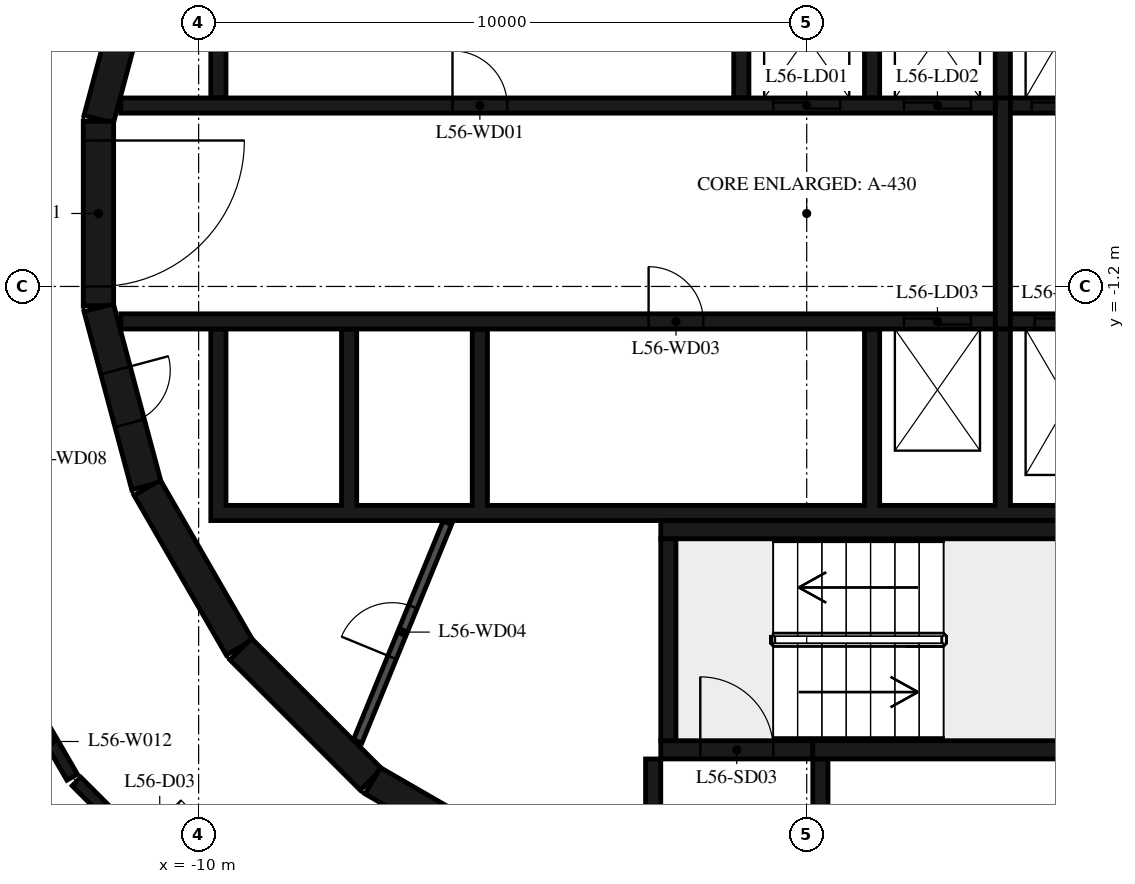
"""IFC4 building model, lengths in metres.
Left out: names, types, materials, properties, quantities, classifications, styles, units other than length and angle.
Written with IfcOpenShell. Run it as: python <this file> out.ifc"""

import sys

from ifc_helpers import new_model, si_unit, direction, frame, frame_2d, origin, place, context, subcontext, project, spatial, polyline, rectangle, outline, extrude, element, fill, save


model = new_model("IFC4")
c1 = context("Model", 3, precision=1e-05, world=origin(), true_north=direction((0.0, 1.0)))
c2 = subcontext(c1, "Body", "Model", "MODEL_VIEW")
j1 = project(units=[si_unit("LENGTHUNIT", "METRE"), si_unit("PLANEANGLEUNIT", "RADIAN")], contexts=[c1])
p1 = place(None, origin())
s1 = spatial("IfcSite", under=j1, at=p1, CompositionType="ELEMENT")
p2 = place(p1, origin())
s2 = spatial("IfcBuilding", under=s1, at=p2, CompositionType="ELEMENT")
p3 = place(p2, frame((0.0, 0.0, 219.9)))
s3 = spatial("IfcBuildingStorey", under=s2, at=p3, CompositionType="ELEMENT", Elevation=219.9)
p4 = place(p3, frame((-10.858, 4.479, 0.0), z_axis=(0.0, 0.0, 1.0), x_axis=(-0.258734743916, -0.965948410781, 0.0)))
e1 = element("IfcWall", 1, at=p4, inside=s3, PredefinedType="SHEAR", context=c2, shape_type="SweptSolid", body=[
    extrude(rectangle(XDim=3.033, YDim=0.5, at=frame_2d((1.516, 0.0))), origin(), (0.0, 0.0, 1.0), 6.35),
])
p5 = place(p3, frame((-11.647, 1.516, 0.0), z_axis=(0.0, 0.0, 1.0), x_axis=(0.0, -1.0, 0.0)))
e2 = element("IfcWall", 2, at=p5, inside=s3, PredefinedType="SHEAR", context=c2, shape_type="SweptSolid", body=[
    extrude(rectangle(XDim=3.033, YDim=0.5, at=frame_2d((1.516, 0.0))), origin(), (0.0, 0.0, 1.0), 6.35),
])
p6 = place(p5, frame((0.316, 0.0, 0.0)))
e3 = element("IfcOpeningElement", 3, at=p6, cuts=e2, PredefinedType="OPENING", context=c2, shape_type="SweptSolid", body=[
    extrude(rectangle(XDim=2.4, YDim=2.1, at=frame_2d((1.2, 1.05))), frame((0.0, 0.26, 0.0), z_axis=(0.0, -1.0, 0.0), x_axis=(1.0, 0.0, 0.0)), (0.0, 0.0, 1.0), 0.52),
])
p7 = place(p3, frame((-11.643, -1.55, 0.0), z_axis=(0.0, 0.0, 1.0), x_axis=(0.258734743916, -0.965948410781, 0.0)))
e4 = element("IfcWall", 4, at=p7, inside=s3, PredefinedType="SHEAR", context=c2, shape_type="SweptSolid", body=[
    extrude(rectangle(XDim=3.033, YDim=0.5, at=frame_2d((1.516, 0.0))), origin(), (0.0, 0.0, 1.0), 6.35),
])
p8 = place(p7, frame((1.066, 0.0, 0.0)))
e5 = element("IfcOpeningElement", 5, at=p8, cuts=e4, PredefinedType="OPENING", context=c2, shape_type="SweptSolid", body=[
    extrude(rectangle(XDim=0.9, YDim=2.1, at=frame_2d((0.45, 1.05))), frame((0.0, 0.26, 0.0), z_axis=(0.0, -1.0, 0.0), x_axis=(1.0, 0.0, 0.0)), (0.0, 0.0, 1.0), 0.52),
])
p9 = place(p3, frame((-10.845, -4.51, 0.0), z_axis=(0.0, 0.0, 1.0), x_axis=(0.500087131594, -0.865975092491, 0.0)))
e6 = element("IfcWall", 6, at=p9, inside=s3, PredefinedType="SHEAR", context=c2, shape_type="SweptSolid", body=[
    extrude(rectangle(XDim=3.033, YDim=0.5, at=frame_2d((1.516, 0.0))), origin(), (0.0, 0.0, 1.0), 6.35),
])
p10 = place(p3, frame((-9.308, -7.164, 0.0), z_axis=(0.0, 0.0, 1.0), x_axis=(0.707106781187, -0.707106781187, 0.0)))
e7 = element("IfcWall", 7, at=p10, inside=s3, PredefinedType="SHEAR", context=c2, shape_type="SweptSolid", body=[
    extrude(rectangle(XDim=3.032, YDim=0.5, at=frame_2d((1.516, 0.0))), origin(), (0.0, 0.0, 1.0), 6.35),
])
p11 = place(p3, frame((-7.137, -9.329, 0.0), z_axis=(0.0, 0.0, 1.0), x_axis=(0.865975092491, -0.500087131594, 0.0)))
e8 = element("IfcWall", 8, at=p11, inside=s3, PredefinedType="SHEAR", context=c2, shape_type="SweptSolid", body=[
    extrude(rectangle(XDim=3.033, YDim=0.5, at=frame_2d((1.516, 0.0))), origin(), (0.0, 0.0, 1.0), 6.35),
])
p12 = place(p3, frame((-2.275, -8.67, 0.0), z_axis=(0.0, 0.0, 1.0), x_axis=(0.0, 1.0, 0.0)))
e9 = element("IfcWall", 9, at=p12, inside=s3, PredefinedType="SHEAR", context=c2, shape_type="SweptSolid", body=[
    extrude(rectangle(XDim=3.32, YDim=0.25, at=frame_2d((1.66, 0.0))), origin(), (0.0, 0.0, 1.0), 6.35),
])
p13 = place(p3, frame((-2.4, -5.2, 0.0), z_axis=(0.0, 0.0, 1.0), x_axis=(1.0, 0.0, 0.0)))
e10 = element("IfcWall", 10, at=p13, inside=s3, PredefinedType="SHEAR", context=c2, shape_type="SweptSolid", body=[
    extrude(rectangle(XDim=7.05, YDim=0.3, at=frame_2d((3.525, 0.0))), origin(), (0.0, 0.0, 1.0), 6.35),
])
p14 = place(p3, frame((0.1, -8.82, 0.0), z_axis=(0.0, 0.0, 1.0), x_axis=(1.0, 0.0, 0.0)))
e11 = element("IfcWall", 11, at=p14, inside=s3, PredefinedType="SHEAR", context=c2, shape_type="SweptSolid", body=[
    extrude(rectangle(XDim=4.55, YDim=0.3, at=frame_2d((2.275, 0.0))), origin(), (0.0, 0.0, 1.0), 6.35),
])
p15 = place(p3, frame((-2.4, -8.82, 0.0), z_axis=(0.0, 0.0, 1.0), x_axis=(1.0, 0.0, 0.0)))
e12 = element("IfcWall", 12, at=p15, inside=s3, PredefinedType="SHEAR", context=c2, shape_type="SweptSolid", body=[
    extrude(rectangle(XDim=2.5, YDim=0.3, at=frame_2d((1.25, 0.0))), origin(), (0.0, 0.0, 1.0), 6.35),
])
p16 = place(p15, frame((0.65, 0.0, 0.0)))
e13 = element("IfcOpeningElement", 13, at=p16, cuts=e12, PredefinedType="OPENING", context=c2, shape_type="SweptSolid", body=[
    extrude(rectangle(XDim=1.2, YDim=2.1, at=frame_2d((0.6, 1.05))), frame((0.0, 0.16, 0.0), z_axis=(0.0, -1.0, 0.0), x_axis=(1.0, 0.0, 0.0)), (0.0, 0.0, 1.0), 0.32),
])
p17 = place(p3, frame((-2.525, -8.97, 0.0), z_axis=(0.0, 0.0, 1.0), x_axis=(0.0, -1.0, 0.0)))
e14 = element("IfcWall", 14, at=p17, inside=s3, PredefinedType="SHEAR", context=c2, shape_type="SweptSolid", body=[
    extrude(rectangle(XDim=2.11, YDim=0.25, at=frame_2d((1.055, 0.0))), origin(), (0.0, 0.0, 1.0), 6.35),
])
p18 = place(p3, frame((0.225, -8.97, 0.0), z_axis=(0.0, 0.0, 1.0), x_axis=(0.0, -1.0, 0.0)))
e15 = element("IfcWall", 15, at=p18, inside=s3, PredefinedType="SHEAR", context=c2, shape_type="SweptSolid", body=[
    extrude(rectangle(XDim=2.41, YDim=0.25, at=frame_2d((1.205, 0.0))), origin(), (0.0, 0.0, 1.0), 6.35),
])
p19 = place(p3, origin())
e16 = element("IfcWall", 16, at=p19, inside=s3, PredefinedType="SHEAR", context=c2, shape_type="SweptSolid", body=[
    extrude(outline(polyline([(-9.55, 4.8), (-1.2, 4.8), (-1.2, 1.9), (-0.95, 1.9), (-0.95, 4.8), (0.95, 4.8), (0.95, 1.9), (1.2, 1.9), (1.2, 4.8), (3.1, 4.8), (3.1, 1.9), (3.35, 1.9), (3.35, 4.8), (5.25, 4.8), (5.25, 1.9), (5.5, 1.9), (5.5, 4.8), (7.4, 4.8), (7.4, 1.9), (7.65, 1.9), (7.65, 4.8), (9.55, 4.8), (9.55, 1.9), (9.8, 1.9), (9.8, 4.8), (9.8, 5.05), (-9.8, 5.05), (-9.8, 4.8), (-9.8, 1.9), (-9.55, 1.9), (-9.55, 4.8)])), origin(), (0.0, 0.0, 1.0), 6.35),
])
p20 = place(p3, origin())
e17 = element("IfcWall", 17, at=p20, inside=s3, PredefinedType="SHEAR", context=c2, shape_type="SweptSolid", body=[
    extrude(outline(polyline([(9.8, -5.05), (9.8, -4.8), (9.8, -1.9), (9.55, -1.9), (9.55, -4.8), (7.65, -4.8), (7.65, -1.9), (7.4, -1.9), (7.4, -4.8), (5.5, -4.8), (5.5, -1.9), (5.25, -1.9), (5.25, -4.8), (3.35, -4.8), (3.35, -1.9), (3.1, -1.9), (3.1, -4.8), (1.2, -4.8), (1.2, -1.9), (0.95, -1.9), (0.95, -4.8), (-5.25, -4.8), (-5.25, -1.9), (-5.5, -1.9), (-5.5, -4.8), (-7.4, -4.8), (-7.4, -1.9), (-7.65, -1.9), (-7.65, -4.8), (-9.55, -4.8), (-9.55, -1.9), (-9.8, -1.9), (-9.8, -4.8), (-9.8, -5.05), (9.8, -5.05)])), origin(), (0.0, 0.0, 1.0), 6.35),
])
p21 = place(p3, frame((-11.28, 1.775, 0.0), z_axis=(0.0, 0.0, 1.0), x_axis=(1.0, 0.0, 0.0)))
e18 = element("IfcWall", 18, at=p21, inside=s3, PredefinedType="SHEAR", context=c2, shape_type="SweptSolid", body=[
    extrude(rectangle(XDim=14.38, YDim=0.25, at=frame_2d((7.19, 0.0))), origin(), (0.0, 0.0, 1.0), 6.35),
])
p22 = place(p21, frame((10.73, 0.0, 0.0)))
e19 = element("IfcOpeningElement", 19, at=p22, cuts=e18, PredefinedType="OPENING", context=c2, shape_type="SweptSolid", body=[
    extrude(rectangle(XDim=1.1, YDim=2.1, at=frame_2d((0.55, 1.05))), frame((0.0, 0.135, 0.0), z_axis=(0.0, -1.0, 0.0), x_axis=(1.0, 0.0, 0.0)), (0.0, 0.0, 1.0), 0.27),
])
p23 = place(p21, frame((12.88, 0.0, 0.0)))
e20 = element("IfcOpeningElement", 20, at=p23, cuts=e18, PredefinedType="OPENING", context=c2, shape_type="SweptSolid", body=[
    extrude(rectangle(XDim=1.1, YDim=2.1, at=frame_2d((0.55, 1.05))), frame((0.0, 0.135, 0.0), z_axis=(0.0, -1.0, 0.0), x_axis=(1.0, 0.0, 0.0)), (0.0, 0.0, 1.0), 0.27),
])
p24 = place(p21, frame((5.455, 0.0, 0.0)))
e21 = element("IfcOpeningElement", 21, at=p24, cuts=e18, PredefinedType="OPENING", context=c2, shape_type="SweptSolid", body=[
    extrude(rectangle(XDim=0.9, YDim=2.1, at=frame_2d((0.45, 1.05))), frame((0.0, 0.135, 0.0), z_axis=(0.0, -1.0, 0.0), x_axis=(1.0, 0.0, 0.0)), (0.0, 0.0, 1.0), 0.27),
])
p25 = place(p3, frame((3.35, 1.775, 0.0), z_axis=(0.0, 0.0, 1.0), x_axis=(1.0, 0.0, 0.0)))
e22 = element("IfcWall", 22, at=p25, inside=s3, PredefinedType="SHEAR", context=c2, shape_type="SweptSolid", body=[
    extrude(rectangle(XDim=7.93, YDim=0.25, at=frame_2d((3.965, 0.0))), origin(), (0.0, 0.0, 1.0), 6.35),
])
p26 = place(p25, frame((0.35, 0.0, 0.0)))
e23 = element("IfcOpeningElement", 23, at=p26, cuts=e22, PredefinedType="OPENING", context=c2, shape_type="SweptSolid", body=[
    extrude(rectangle(XDim=1.2, YDim=2.4, at=frame_2d((0.6, 1.2))), frame((0.0, 0.135, 0.0), z_axis=(0.0, -1.0, 0.0), x_axis=(1.0, 0.0, 0.0)), (0.0, 0.0, 1.0), 0.27),
])
p27 = place(p25, frame((2.5, 0.0, 0.0)))
e24 = element("IfcOpeningElement", 24, at=p27, cuts=e22, PredefinedType="OPENING", context=c2, shape_type="SweptSolid", body=[
    extrude(rectangle(XDim=1.2, YDim=2.4, at=frame_2d((0.6, 1.2))), frame((0.0, 0.135, 0.0), z_axis=(0.0, -1.0, 0.0), x_axis=(1.0, 0.0, 0.0)), (0.0, 0.0, 1.0), 0.27),
])
p28 = place(p25, frame((4.8, 0.0, 0.0)))
e25 = element("IfcOpeningElement", 25, at=p28, cuts=e22, PredefinedType="OPENING", context=c2, shape_type="SweptSolid", body=[
    extrude(rectangle(XDim=0.9, YDim=2.1, at=frame_2d((0.45, 1.05))), frame((0.0, 0.135, 0.0), z_axis=(0.0, -1.0, 0.0), x_axis=(1.0, 0.0, 0.0)), (0.0, 0.0, 1.0), 0.27),
])
p29 = place(p3, frame((-11.28, -1.775, 0.0), z_axis=(0.0, 0.0, 1.0), x_axis=(1.0, 0.0, 0.0)))
e26 = element("IfcWall", 26, at=p29, inside=s3, PredefinedType="SHEAR", context=c2, shape_type="SweptSolid", body=[
    extrude(rectangle(XDim=14.38, YDim=0.25, at=frame_2d((7.19, 0.0))), origin(), (0.0, 0.0, 1.0), 6.35),
])
p30 = place(p29, frame((12.88, 0.0, 0.0)))
e27 = element("IfcOpeningElement", 27, at=p30, cuts=e26, PredefinedType="OPENING", context=c2, shape_type="SweptSolid", body=[
    extrude(rectangle(XDim=1.1, YDim=2.1, at=frame_2d((0.55, 1.05))), frame((0.0, 0.135, 0.0), z_axis=(0.0, -1.0, 0.0), x_axis=(1.0, 0.0, 0.0)), (0.0, 0.0, 1.0), 0.27),
])
p31 = place(p29, frame((8.68, 0.0, 0.0)))
e28 = element("IfcOpeningElement", 28, at=p31, cuts=e26, PredefinedType="OPENING", context=c2, shape_type="SweptSolid", body=[
    extrude(rectangle(XDim=0.9, YDim=2.1, at=frame_2d((0.45, 1.05))), frame((0.0, 0.135, 0.0), z_axis=(0.0, -1.0, 0.0), x_axis=(1.0, 0.0, 0.0)), (0.0, 0.0, 1.0), 0.27),
])
p32 = place(p3, frame((3.35, -1.775, 0.0), z_axis=(0.0, 0.0, 1.0), x_axis=(1.0, 0.0, 0.0)))
e29 = element("IfcWall", 29, at=p32, inside=s3, PredefinedType="SHEAR", context=c2, shape_type="SweptSolid", body=[
    extrude(rectangle(XDim=7.93, YDim=0.25, at=frame_2d((3.965, 0.0))), origin(), (0.0, 0.0, 1.0), 6.35),
])
p33 = place(p32, frame((0.4, 0.0, 0.0)))
e30 = element("IfcOpeningElement", 30, at=p33, cuts=e29, PredefinedType="OPENING", context=c2, shape_type="SweptSolid", body=[
    extrude(rectangle(XDim=1.1, YDim=2.4, at=frame_2d((0.55, 1.2))), frame((0.0, 0.135, 0.0), z_axis=(0.0, -1.0, 0.0), x_axis=(1.0, 0.0, 0.0)), (0.0, 0.0, 1.0), 0.27),
])
p34 = place(p32, frame((2.55, 0.0, 0.0)))
e31 = element("IfcOpeningElement", 31, at=p34, cuts=e29, PredefinedType="OPENING", context=c2, shape_type="SweptSolid", body=[
    extrude(rectangle(XDim=1.1, YDim=2.4, at=frame_2d((0.55, 1.2))), frame((0.0, 0.135, 0.0), z_axis=(0.0, -1.0, 0.0), x_axis=(1.0, 0.0, 0.0)), (0.0, 0.0, 1.0), 0.27),
])
p35 = place(p32, frame((4.7, 0.0, 0.0)))
e32 = element("IfcOpeningElement", 32, at=p35, cuts=e29, PredefinedType="OPENING", context=c2, shape_type="SweptSolid", body=[
    extrude(rectangle(XDim=1.1, YDim=2.4, at=frame_2d((0.55, 1.2))), frame((0.0, 0.135, 0.0), z_axis=(0.0, -1.0, 0.0), x_axis=(1.0, 0.0, 0.0)), (0.0, 0.0, 1.0), 0.27),
])
p36 = place(p3, frame((3.225, -1.9, 0.0), z_axis=(0.0, 0.0, 1.0), x_axis=(0.0, 1.0, 0.0)))
e33 = element("IfcWall", 33, at=p36, inside=s3, PredefinedType="SHEAR", context=c2, shape_type="SweptSolid", body=[
    extrude(rectangle(XDim=3.8, YDim=0.25, at=frame_2d((1.9, 0.0))), origin(), (0.0, 0.0, 1.0), 6.35),
])
p37 = place(p3, frame((-7.385, -8.681, 0.0), z_axis=(0.0, 0.0, 1.0), x_axis=(0.379804590409, 0.925066739811, 0.0)))
e34 = element("IfcWall", 34, at=p37, inside=s3, PredefinedType="PARTITIONING", context=c2, shape_type="SweptSolid", body=[
    extrude(rectangle(XDim=3.885, YDim=0.15, at=frame_2d((1.942, 0.0))), origin(), (0.0, 0.0, 1.0), 6.35),
])
p38 = place(p37, frame((1.493, 0.0, 0.0)))
e35 = element("IfcOpeningElement", 35, at=p38, cuts=e34, PredefinedType="OPENING", context=c2, shape_type="SweptSolid", body=[
    extrude(rectangle(XDim=0.9, YDim=2.1, at=frame_2d((0.45, 1.05))), frame((0.0, 0.085, 0.0), z_axis=(0.0, -1.0, 0.0), x_axis=(1.0, 0.0, 0.0)), (0.0, 0.0, 1.0), 0.17),
])
p39 = place(p3, frame((-12.76, -8.096, 0.0), z_axis=(0.0, 0.0, 1.0), x_axis=(0.501171091484, -0.865348217229, 0.0)))
e36 = element("IfcWall", 36, at=p39, inside=s3, PredefinedType="PARTITIONING", context=c2, shape_type="SweptSolid", body=[
    extrude(rectangle(XDim=1.356, YDim=0.2, at=frame_2d((0.678, 0.0))), origin(), (0.0, 0.0, 1.0), 6.35),
])
p40 = place(p3, frame((-12.009, -9.341, 0.0), z_axis=(0.0, 0.0, 1.0), x_axis=(0.707106781187, -0.707106781187, 0.0)))
e37 = element("IfcWall", 37, at=p40, inside=s3, PredefinedType="PARTITIONING", context=c2, shape_type="SweptSolid", body=[
    extrude(rectangle(XDim=3.874, YDim=0.2, at=frame_2d((1.937, 0.0))), origin(), (0.0, 0.0, 1.0), 6.35),
])
p41 = place(p40, frame((1.437, 0.0, 0.0)))
e38 = element("IfcOpeningElement", 38, at=p41, cuts=e37, PredefinedType="OPENING", context=c2, shape_type="SweptSolid", body=[
    extrude(rectangle(XDim=1.0, YDim=2.1, at=frame_2d((0.5, 1.05))), frame((0.0, 0.11, 0.0), z_axis=(0.0, -1.0, 0.0), x_axis=(1.0, 0.0, 0.0)), (0.0, 0.0, 1.0), 0.22),
])
p42 = place(p16, origin())
e39 = element("IfcDoor", 39, at=p42, inside=s3, OperationType="SINGLE_SWING_LEFT", PredefinedType="DOOR", context=c2, shape_type="SweptSolid", body=[
    extrude(rectangle(XDim=1.2, YDim=2.1, at=frame_2d((0.6, 1.05))), frame((0.0, 0.025, 0.0), z_axis=(0.0, -1.0, 0.0), x_axis=(1.0, 0.0, 0.0)), (0.0, 0.0, 1.0), 0.05),
])
fill(e13, e39)
p43 = place(p6, origin())
e40 = element("IfcDoor", 40, at=p43, inside=s3, OperationType="DOUBLE_DOOR_SINGLE_SWING", PredefinedType="DOOR", context=c2, shape_type="SweptSolid", body=[
    extrude(rectangle(XDim=2.4, YDim=2.1, at=frame_2d((1.2, 1.05))), frame((0.0, 0.025, 0.0), z_axis=(0.0, -1.0, 0.0), x_axis=(1.0, 0.0, 0.0)), (0.0, 0.0, 1.0), 0.05),
])
fill(e3, e40)
p44 = place(p22, origin())
e41 = element("IfcDoor", 41, at=p44, inside=s3, OperationType="DOUBLE_DOOR_SLIDING", PredefinedType="DOOR", context=c2, shape_type="SweptSolid", body=[
    extrude(rectangle(XDim=1.1, YDim=2.1, at=frame_2d((0.55, 1.05))), frame((0.0, 0.025, 0.0), z_axis=(0.0, -1.0, 0.0), x_axis=(1.0, 0.0, 0.0)), (0.0, 0.0, 1.0), 0.05),
])
fill(e19, e41)
p45 = place(p23, origin())
e42 = element("IfcDoor", 42, at=p45, inside=s3, OperationType="DOUBLE_DOOR_SLIDING", PredefinedType="DOOR", context=c2, shape_type="SweptSolid", body=[
    extrude(rectangle(XDim=1.1, YDim=2.1, at=frame_2d((0.55, 1.05))), frame((0.0, 0.025, 0.0), z_axis=(0.0, -1.0, 0.0), x_axis=(1.0, 0.0, 0.0)), (0.0, 0.0, 1.0), 0.05),
])
fill(e20, e42)
p46 = place(p26, origin())
e43 = element("IfcDoor", 43, at=p46, inside=s3, OperationType="DOUBLE_DOOR_SLIDING", PredefinedType="DOOR", context=c2, shape_type="SweptSolid", body=[
    extrude(rectangle(XDim=1.2, YDim=2.4, at=frame_2d((0.6, 1.2))), frame((0.0, 0.025, 0.0), z_axis=(0.0, -1.0, 0.0), x_axis=(1.0, 0.0, 0.0)), (0.0, 0.0, 1.0), 0.05),
])
fill(e23, e43)
p47 = place(p30, origin())
e44 = element("IfcDoor", 44, at=p47, inside=s3, OperationType="DOUBLE_DOOR_SLIDING", PredefinedType="DOOR", context=c2, shape_type="SweptSolid", body=[
    extrude(rectangle(XDim=1.1, YDim=2.1, at=frame_2d((0.55, 1.05))), frame((0.0, 0.025, 0.0), z_axis=(0.0, -1.0, 0.0), x_axis=(1.0, 0.0, 0.0)), (0.0, 0.0, 1.0), 0.05),
])
fill(e27, e44)
p48 = place(p33, origin())
e45 = element("IfcDoor", 45, at=p48, inside=s3, OperationType="DOUBLE_DOOR_SLIDING", PredefinedType="DOOR", context=c2, shape_type="SweptSolid", body=[
    extrude(rectangle(XDim=1.1, YDim=2.4, at=frame_2d((0.55, 1.2))), frame((0.0, 0.025, 0.0), z_axis=(0.0, -1.0, 0.0), x_axis=(1.0, 0.0, 0.0)), (0.0, 0.0, 1.0), 0.05),
])
fill(e30, e45)
p49 = place(p24, origin())
e46 = element("IfcDoor", 46, at=p49, inside=s3, OperationType="SINGLE_SWING_LEFT", PredefinedType="DOOR", context=c2, shape_type="SweptSolid", body=[
    extrude(rectangle(XDim=0.9, YDim=2.1, at=frame_2d((0.45, 1.05))), frame((0.0, 0.025, 0.0), z_axis=(0.0, -1.0, 0.0), x_axis=(1.0, 0.0, 0.0)), (0.0, 0.0, 1.0), 0.05),
])
fill(e21, e46)
p50 = place(p31, origin())
e47 = element("IfcDoor", 47, at=p50, inside=s3, OperationType="SINGLE_SWING_LEFT", PredefinedType="DOOR", context=c2, shape_type="SweptSolid", body=[
    extrude(rectangle(XDim=0.9, YDim=2.1, at=frame_2d((0.45, 1.05))), frame((0.0, 0.025, 0.0), z_axis=(0.0, -1.0, 0.0), x_axis=(1.0, 0.0, 0.0)), (0.0, 0.0, 1.0), 0.05),
])
fill(e28, e47)
p51 = place(p38, origin())
e48 = element("IfcDoor", 48, at=p51, inside=s3, OperationType="SINGLE_SWING_RIGHT", PredefinedType="DOOR", context=c2, shape_type="SweptSolid", body=[
    extrude(rectangle(XDim=0.9, YDim=2.1, at=frame_2d((0.45, 1.05))), frame((0.0, 0.025, 0.0), z_axis=(0.0, -1.0, 0.0), x_axis=(1.0, 0.0, 0.0)), (0.0, 0.0, 1.0), 0.05),
])
fill(e35, e48)
p52 = place(p8, origin())
e49 = element("IfcDoor", 49, at=p52, inside=s3, OperationType="SINGLE_SWING_RIGHT", PredefinedType="DOOR", context=c2, shape_type="SweptSolid", body=[
    extrude(rectangle(XDim=0.9, YDim=2.1, at=frame_2d((0.45, 1.05))), frame((0.0, 0.025, 0.0), z_axis=(0.0, -1.0, 0.0), x_axis=(1.0, 0.0, 0.0)), (0.0, 0.0, 1.0), 0.05),
])
fill(e5, e49)
save(model, sys.argv[1])
